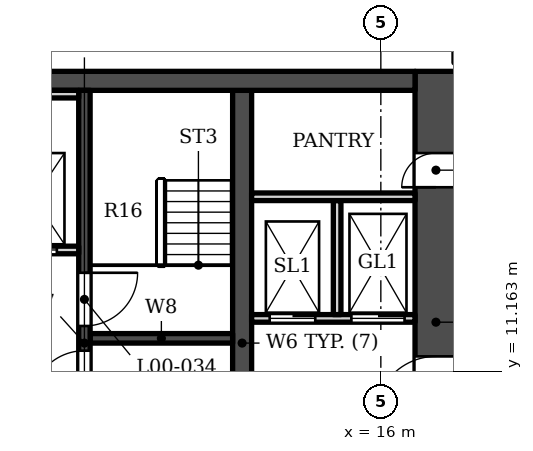
"""IFC4 building model, lengths in metres.
Left out: names, types, materials, properties, quantities, classifications, styles, units other than length and angle.
Written with IfcOpenShell. Run it as: python <this file> out.ifc"""

import sys

from ifc_helpers import new_model, si_unit, direction, frame, frame_2d, origin, place, context, subcontext, project, spatial, rectangle, extrude, element, fill, save


model = new_model("IFC4")
c1 = context("Model", 3, precision=1e-05, world=origin(), true_north=direction((0.0, 1.0)))
c2 = subcontext(c1, "Body", "Model", "MODEL_VIEW")
j1 = project(units=[si_unit("LENGTHUNIT", "METRE"), si_unit("PLANEANGLEUNIT", "RADIAN")], contexts=[c1])
p1 = place(None, origin())
s1 = spatial("IfcSite", under=j1, at=p1, CompositionType="ELEMENT")
p2 = place(p1, origin())
s2 = spatial("IfcBuilding", under=s1, at=p2, CompositionType="ELEMENT")
p3 = place(p2, origin())
s3 = spatial("IfcBuildingStorey", under=s2, at=p3, CompositionType="ELEMENT", Elevation=0.0)
p4 = place(p3, frame((-16.9, 18.802, 0.0), z_axis=(0.0, 0.0, 1.0), x_axis=(1.0, 0.0, 0.0)))
e1 = element("IfcWall", 1, at=p4, inside=s3, PredefinedType="SHEAR", context=c2, shape_type="SweptSolid", body=[
    extrude(rectangle(XDim=33.8, YDim=0.5, at=frame_2d((16.9, 0.0))), origin(), (0.0, 0.0, 1.0), 9.0),
])
p5 = place(p4, frame((14.05, 0.0, 0.0)))
e2 = element("IfcOpeningElement", 2, at=p5, cuts=e1, PredefinedType="OPENING", context=c2, shape_type="SweptSolid", body=[
    extrude(rectangle(XDim=1.2, YDim=2.1, at=frame_2d((0.6, 1.05))), frame((0.0, 0.26, 0.0), z_axis=(0.0, -1.0, 0.0), x_axis=(1.0, 0.0, 0.0)), (0.0, 0.0, 1.0), 0.52),
])
p6 = place(p3, frame((12.35, 5.253, 0.0), z_axis=(0.0, 0.0, 1.0), x_axis=(0.0, 1.0, 0.0)))
e3 = element("IfcWall", 3, at=p6, inside=s3, PredefinedType="SHEAR", context=c2, shape_type="SweptSolid", body=[
    extrude(rectangle(XDim=13.3, YDim=0.5, at=frame_2d((6.65, 0.0))), origin(), (0.0, 0.0, 1.0), 9.0),
])
p7 = place(p3, frame((8.2, 5.253, 0.0), z_axis=(0.0, 0.0, 1.0), x_axis=(0.0, 1.0, 0.0)))
e4 = element("IfcWall", 4, at=p7, inside=s3, PredefinedType="SHEAR", context=c2, shape_type="SweptSolid", body=[
    extrude(rectangle(XDim=13.3, YDim=0.3, at=frame_2d((6.65, 0.0))), origin(), (0.0, 0.0, 1.0), 9.0),
])
p8 = place(p7, frame((7.1, 0.0, 0.0)))
e5 = element("IfcOpeningElement", 5, at=p8, cuts=e4, PredefinedType="OPENING", context=c2, shape_type="SweptSolid", body=[
    extrude(rectangle(XDim=1.4, YDim=2.1, at=frame_2d((0.7, 1.05))), frame((0.0, 0.16, 0.0), z_axis=(0.0, -1.0, 0.0), x_axis=(1.0, 0.0, 0.0)), (0.0, 0.0, 1.0), 0.32),
])
p9 = place(p7, frame((5.05, 0.0, 0.0)))
e6 = element("IfcOpeningElement", 6, at=p9, cuts=e4, PredefinedType="OPENING", context=c2, shape_type="SweptSolid", body=[
    extrude(rectangle(XDim=1.4, YDim=2.1, at=frame_2d((0.7, 1.05))), frame((0.0, 0.16, 0.0), z_axis=(0.0, -1.0, 0.0), x_axis=(1.0, 0.0, 0.0)), (0.0, 0.0, 1.0), 0.32),
])
p10 = place(p3, frame((8.35, 12.028, 0.0), z_axis=(0.0, 0.0, 1.0), x_axis=(1.0, 0.0, 0.0)))
e7 = element("IfcWall", 7, at=p10, inside=s3, PredefinedType="SHEAR", context=c2, shape_type="SweptSolid", body=[
    extrude(rectangle(XDim=3.75, YDim=0.25, at=frame_2d((1.875, 0.0))), origin(), (0.0, 0.0, 1.0), 9.0),
])
p11 = place(p3, frame((17.45, 5.853, 0.0), z_axis=(0.0, 0.0, 1.0), x_axis=(0.0, 1.0, 0.0)))
e8 = element("IfcWall", 8, at=p11, inside=s3, PredefinedType="SHEAR", context=c2, shape_type="SweptSolid", body=[
    extrude(rectangle(XDim=13.2, YDim=1.1, at=frame_2d((6.6, 0.0))), origin(), (0.0, 0.0, 1.0), 9.0),
])
p12 = place(p11, frame((4.1, 0.0, 0.0)))
e9 = element("IfcOpeningElement", 9, at=p12, cuts=e8, PredefinedType="OPENING", context=c2, shape_type="SweptSolid", body=[
    extrude(rectangle(XDim=1.6, YDim=2.1, at=frame_2d((0.8, 1.05))), frame((0.0, 0.56, 0.0), z_axis=(0.0, -1.0, 0.0), x_axis=(1.0, 0.0, 0.0)), (0.0, 0.0, 1.0), 1.12),
])
p13 = place(p11, frame((10.15, 0.0, 0.0)))
e10 = element("IfcOpeningElement", 10, at=p13, cuts=e8, PredefinedType="OPENING", context=c2, shape_type="SweptSolid", body=[
    extrude(rectangle(XDim=0.9, YDim=2.1, at=frame_2d((0.45, 1.05))), frame((0.0, 0.56, 0.0), z_axis=(0.0, -1.0, 0.0), x_axis=(1.0, 0.0, 0.0)), (0.0, 0.0, 1.0), 1.12),
])
p14 = place(p3, frame((12.6, 12.552, 0.0), z_axis=(0.0, 0.0, 1.0), x_axis=(1.0, 0.0, 0.0)))
e11 = element("IfcWall", 11, at=p14, inside=s3, PredefinedType="SOLIDWALL", context=c2, shape_type="SweptSolid", body=[
    extrude(rectangle(XDim=4.3, YDim=0.2, at=frame_2d((2.15, 0.0))), origin(), (0.0, 0.0, 1.0), 8.5),
])
p15 = place(p14, frame((0.475, 0.0, 0.0)))
e12 = element("IfcOpeningElement", 12, at=p15, cuts=e11, PredefinedType="OPENING", context=c2, shape_type="SweptSolid", body=[
    extrude(rectangle(XDim=1.2, YDim=2.1, at=frame_2d((0.6, 1.05))), frame((0.0, 0.11, 0.0), z_axis=(0.0, -1.0, 0.0), x_axis=(1.0, 0.0, 0.0)), (0.0, 0.0, 1.0), 0.22),
])
p16 = place(p14, frame((2.625, 0.0, 0.0)))
e13 = element("IfcOpeningElement", 13, at=p16, cuts=e11, PredefinedType="OPENING", context=c2, shape_type="SweptSolid", body=[
    extrude(rectangle(XDim=1.4, YDim=2.1, at=frame_2d((0.7, 1.05))), frame((0.0, 0.11, 0.0), z_axis=(0.0, -1.0, 0.0), x_axis=(1.0, 0.0, 0.0)), (0.0, 0.0, 1.0), 0.22),
])
p17 = place(p3, frame((14.85, 12.653, 0.0), z_axis=(0.0, 0.0, 1.0), x_axis=(0.0, 1.0, 0.0)))
e14 = element("IfcWall", 14, at=p17, inside=s3, PredefinedType="SOLIDWALL", context=c2, shape_type="SweptSolid", body=[
    extrude(rectangle(XDim=3.0, YDim=0.2, at=frame_2d((1.5, 0.0))), origin(), (0.0, 0.0, 1.0), 8.5),
])
p18 = place(p3, frame((5.3, 14.353, 0.0), z_axis=(0.0, 0.0, 1.0), x_axis=(1.0, 0.0, 0.0)))
e15 = element("IfcWall", 15, at=p18, inside=s3, PredefinedType="SOLIDWALL", context=c2, shape_type="SweptSolid", body=[
    extrude(rectangle(XDim=2.75, YDim=0.2, at=frame_2d((1.375, 0.0))), origin(), (0.0, 0.0, 1.0), 8.5),
])
p19 = place(p18, frame((0.975, 0.0, 0.0)))
e16 = element("IfcOpeningElement", 16, at=p19, cuts=e15, PredefinedType="OPENING", context=c2, shape_type="SweptSolid", body=[
    extrude(rectangle(XDim=1.2, YDim=2.1, at=frame_2d((0.6, 1.05))), frame((0.0, 0.11, 0.0), z_axis=(0.0, -1.0, 0.0), x_axis=(1.0, 0.0, 0.0)), (0.0, 0.0, 1.0), 0.22),
])
p20 = place(p3, frame((12.6, 15.753, 0.0), z_axis=(0.0, 0.0, 1.0), x_axis=(1.0, 0.0, 0.0)))
e17 = element("IfcWall", 17, at=p20, inside=s3, PredefinedType="SOLIDWALL", context=c2, shape_type="SweptSolid", body=[
    extrude(rectangle(XDim=4.3, YDim=0.2, at=frame_2d((2.15, 0.0))), origin(), (0.0, 0.0, 1.0), 8.5),
])
p21 = place(p3, frame((5.5, 18.453, 0.0), z_axis=(0.0, 0.0, 1.0), x_axis=(1.0, 0.0, 0.0)))
e18 = element("IfcWall", 18, at=p21, inside=s3, PredefinedType="SOLIDWALL", context=c2, shape_type="SweptSolid", body=[
    extrude(rectangle(XDim=2.55, YDim=0.2, at=frame_2d((1.275, 0.0))), origin(), (0.0, 0.0, 1.0), 8.5),
])
p22 = place(p19, origin())
e19 = element("IfcDoor", 19, at=p22, inside=s3, OperationType="DOUBLE_DOOR_SLIDING", PredefinedType="DOOR", context=c2, shape_type="SweptSolid", body=[
    extrude(rectangle(XDim=1.2, YDim=2.1, at=frame_2d((0.6, 1.05))), frame((0.0, 0.025, 0.0), z_axis=(0.0, -1.0, 0.0), x_axis=(1.0, 0.0, 0.0)), (0.0, 0.0, 1.0), 0.05),
])
fill(e16, e19)
p23 = place(p15, origin())
e20 = element("IfcDoor", 20, at=p23, inside=s3, OperationType="DOUBLE_DOOR_SLIDING", PredefinedType="DOOR", context=c2, shape_type="SweptSolid", body=[
    extrude(rectangle(XDim=1.2, YDim=2.1, at=frame_2d((0.6, 1.05))), frame((0.0, 0.025, 0.0), z_axis=(0.0, -1.0, 0.0), x_axis=(1.0, 0.0, 0.0)), (0.0, 0.0, 1.0), 0.05),
])
fill(e12, e20)
p24 = place(p16, origin())
e21 = element("IfcDoor", 21, at=p24, inside=s3, OperationType="DOUBLE_DOOR_SLIDING", PredefinedType="DOOR", context=c2, shape_type="SweptSolid", body=[
    extrude(rectangle(XDim=1.4, YDim=2.1, at=frame_2d((0.7, 1.05))), frame((0.0, 0.025, 0.0), z_axis=(0.0, -1.0, 0.0), x_axis=(1.0, 0.0, 0.0)), (0.0, 0.0, 1.0), 0.05),
])
fill(e13, e21)
p25 = place(p8, origin())
e22 = element("IfcDoor", 22, at=p25, inside=s3, OperationType="SINGLE_SWING_RIGHT", PredefinedType="DOOR", context=c2, shape_type="SweptSolid", body=[
    extrude(rectangle(XDim=1.4, YDim=2.1, at=frame_2d((0.7, 1.05))), frame((0.0, 0.025, 0.0), z_axis=(0.0, -1.0, 0.0), x_axis=(1.0, 0.0, 0.0)), (0.0, 0.0, 1.0), 0.05),
])
fill(e5, e22)
p26 = place(p9, origin())
e23 = element("IfcDoor", 23, at=p26, inside=s3, OperationType="SINGLE_SWING_LEFT", PredefinedType="DOOR", context=c2, shape_type="SweptSolid", body=[
    extrude(rectangle(XDim=1.4, YDim=2.1, at=frame_2d((0.7, 1.05))), frame((0.0, 0.025, 0.0), z_axis=(0.0, -1.0, 0.0), x_axis=(1.0, 0.0, 0.0)), (0.0, 0.0, 1.0), 0.05),
])
fill(e6, e23)
p27 = place(p12, origin())
e24 = element("IfcDoor", 24, at=p27, inside=s3, OperationType="DOUBLE_DOOR_SINGLE_SWING", PredefinedType="DOOR", context=c2, shape_type="SweptSolid", body=[
    extrude(rectangle(XDim=1.6, YDim=2.1, at=frame_2d((0.8, 1.05))), frame((0.0, 0.275, 0.0), z_axis=(0.0, -1.0, 0.0), x_axis=(1.0, 0.0, 0.0)), (0.0, 0.0, 1.0), 0.05),
])
fill(e9, e24)
p28 = place(p13, origin())
e25 = element("IfcDoor", 25, at=p28, inside=s3, OperationType="SINGLE_SWING_LEFT", PredefinedType="DOOR", context=c2, shape_type="SweptSolid", body=[
    extrude(rectangle(XDim=0.9, YDim=2.1, at=frame_2d((0.45, 1.05))), frame((0.0, 0.275, 0.0), z_axis=(0.0, -1.0, 0.0), x_axis=(1.0, 0.0, 0.0)), (0.0, 0.0, 1.0), 0.05),
])
fill(e10, e25)
save(model, sys.argv[1])
